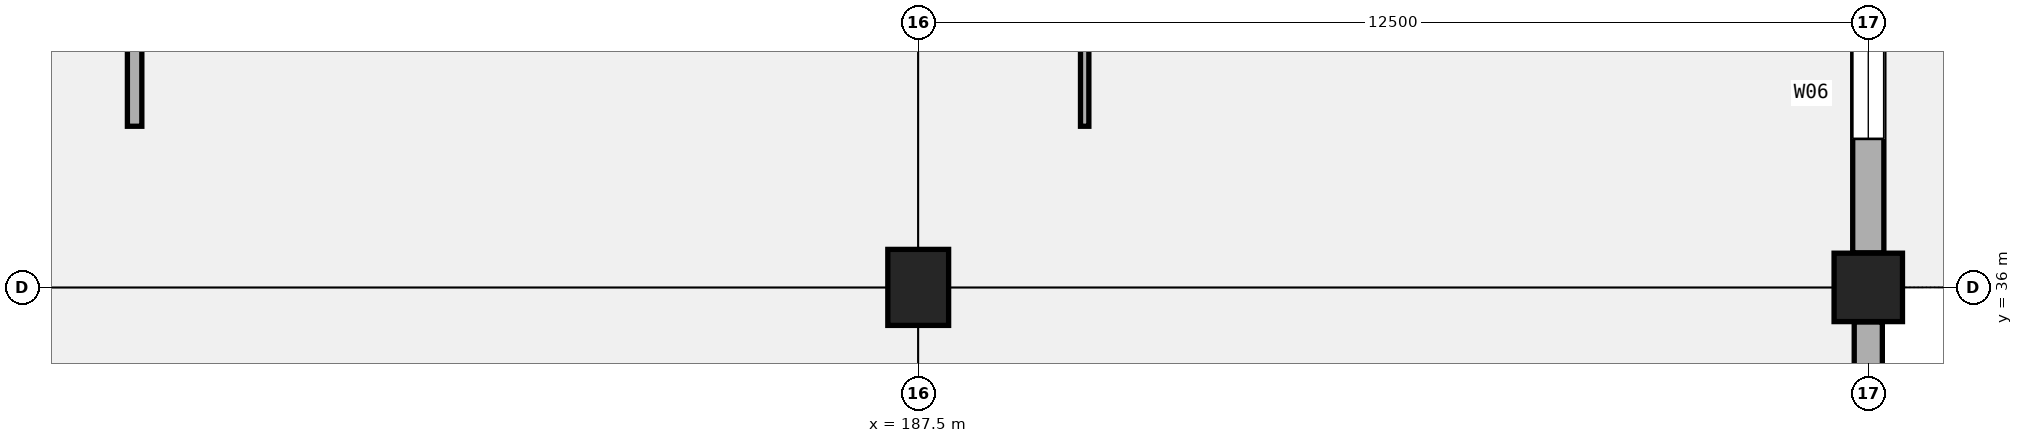
"""IFC4 building model, lengths in metres.
Left out: names, types, materials, properties, quantities, classifications, styles, units other than length and angle.
Written with IfcOpenShell. Run it as: python <this file> out.ifc"""

import sys

from ifc_helpers import new_model, si_unit, direction, frame, frame_2d, origin, origin_2d, place, context, subcontext, project, spatial, rectangle, extrude, element, fill, save


model = new_model("IFC4")
c1 = context("Model", 3, precision=1e-05, world=origin(), true_north=direction((0.0, 1.0)))
c2 = subcontext(c1, "Body", "Model", "MODEL_VIEW")
j1 = project(units=[si_unit("LENGTHUNIT", "METRE"), si_unit("PLANEANGLEUNIT", "RADIAN")], contexts=[c1])
p1 = place(None, origin())
s1 = spatial("IfcSite", under=j1, at=p1, CompositionType="ELEMENT")
p2 = place(p1, origin())
s2 = spatial("IfcBuilding", under=s1, at=p2, CompositionType="ELEMENT")
p3 = place(p2, frame((0.0, 0.0, 10.2)))
s3 = spatial("IfcBuildingStorey", under=s2, at=p3, CompositionType="ELEMENT", Elevation=10.2)
p4 = place(p3, frame((187.5, 36.0, 0.0), z_axis=(0.0, 0.0, 1.0), x_axis=(1.0, 0.0, 0.0)))
e1 = element("IfcColumn", 1, at=p4, inside=s3, PredefinedType="COLUMN", context=c2, shape_type="SweptSolid", body=[
    extrude(rectangle(XDim=0.8, YDim=1.0, at=origin_2d()), origin(), (0.0, 0.0, 1.0), 5.1),
])
p5 = place(p3, frame((200.0, 36.0, 0.0), z_axis=(0.0, 0.0, 1.0), x_axis=(1.0, 0.0, 0.0)))
e2 = element("IfcColumn", 2, at=p5, inside=s3, PredefinedType="COLUMN", context=c2, shape_type="SweptSolid", body=[
    extrude(rectangle(XDim=0.9, YDim=0.9, at=origin_2d()), origin(), (0.0, 0.0, 1.0), 5.1),
])
p6 = place(p3, frame((200.0, 34.896, 0.0), z_axis=(0.0, 0.0, 1.0), x_axis=(0.0, 1.0, 0.0)))
e3 = element("IfcWall", 3, at=p6, inside=s3, PredefinedType="SOLIDWALL", context=c2, shape_type="SweptSolid", body=[
    extrude(rectangle(XDim=0.65, YDim=0.37, at=frame_2d((0.325, 0.0))), origin(), (0.0, 0.0, 1.0), 4.02),
])
p7 = place(p3, frame((200.0, 36.454, 0.0), z_axis=(0.0, 0.0, 1.0), x_axis=(0.0, 1.0, 0.0)))
e4 = element("IfcWall", 4, at=p7, inside=s3, PredefinedType="SOLIDWALL", context=c2, shape_type="SweptSolid", body=[
    extrude(rectangle(XDim=11.142, YDim=0.41, at=frame_2d((5.571, 0.0))), origin(), (0.0, 0.0, 1.0), 4.12),
])
p8 = place(p7, frame((1.5, 0.0, 0.95)))
e5 = element("IfcOpeningElement", 5, at=p8, cuts=e4, PredefinedType="OPENING", context=c2, shape_type="SweptSolid", body=[
    extrude(rectangle(XDim=1.2, YDim=2.3, at=frame_2d((0.6, 1.15))), frame((0.0, 0.215, 0.0), z_axis=(0.0, -1.0, 0.0), x_axis=(1.0, 0.0, 0.0)), (0.0, 0.0, 1.0), 0.43),
])
p9 = place(p3, frame((177.19, 38.12, 0.0), z_axis=(0.0, 0.0, 1.0), x_axis=(0.0, 1.0, 0.0)))
e6 = element("IfcWall", 6, at=p9, inside=s3, PredefinedType="PARTITIONING", context=c2, shape_type="SweptSolid", body=[
    extrude(rectangle(XDim=9.72, YDim=0.19, at=frame_2d((4.86, 0.0))), origin(), (0.0, 0.0, 1.0), 4.22),
])
p10 = place(p9, frame((2.944, 0.0, 0.0), z_axis=(0.0, 0.0, 1.0), x_axis=(-1.0, 0.0, 0.0)))
e7 = element("IfcOpeningElement", 7, at=p10, cuts=e6, PredefinedType="OPENING", context=c2, shape_type="SweptSolid", body=[
    extrude(rectangle(XDim=1.4, YDim=2.24, at=frame_2d((0.7, 1.12))), frame((0.0, 0.105, 0.0), z_axis=(0.0, -1.0, 0.0), x_axis=(1.0, 0.0, 0.0)), (0.0, 0.0, 1.0), 0.21),
])
p11 = place(p9, frame((7.904, 0.0, 0.0), z_axis=(0.0, 0.0, 1.0), x_axis=(-1.0, 0.0, 0.0)))
e8 = element("IfcOpeningElement", 8, at=p11, cuts=e6, PredefinedType="OPENING", context=c2, shape_type="SweptSolid", body=[
    extrude(rectangle(XDim=1.44, YDim=2.26, at=frame_2d((0.72, 1.13))), frame((0.0, 0.105, 0.0), z_axis=(0.0, -1.0, 0.0), x_axis=(1.0, 0.0, 0.0)), (0.0, 0.0, 1.0), 0.21),
])
p12 = place(p3, frame((189.69, 38.12, 0.0), z_axis=(0.0, 0.0, 1.0), x_axis=(0.0, 1.0, 0.0)))
e9 = element("IfcWall", 9, at=p12, inside=s3, PredefinedType="PARTITIONING", context=c2, shape_type="SweptSolid", body=[
    extrude(rectangle(XDim=9.72, YDim=0.11, at=frame_2d((4.86, 0.0))), origin(), (0.0, 0.0, 1.0), 4.22),
])
p13 = place(p12, frame((5.335, 0.0, 0.0), z_axis=(0.0, 0.0, 1.0), x_axis=(-1.0, 0.0, 0.0)))
e10 = element("IfcOpeningElement", 10, at=p13, cuts=e9, PredefinedType="OPENING", context=c2, shape_type="SweptSolid", body=[
    extrude(rectangle(XDim=0.95, YDim=2.12, at=frame_2d((0.475, 1.06))), frame((0.0, 0.065, 0.0), z_axis=(0.0, -1.0, 0.0), x_axis=(1.0, 0.0, 0.0)), (0.0, 0.0, 1.0), 0.13),
])
p14 = place(p8, origin())
e11 = element("IfcWindow", 11, at=p14, inside=s3, PartitioningType="SINGLE_PANEL", PredefinedType="WINDOW", context=c2, shape_type="SweptSolid", body=[
    extrude(rectangle(XDim=1.2, YDim=2.3, at=frame_2d((0.6, 1.15))), frame((0.0, 0.03, 0.0), z_axis=(0.0, -1.0, 0.0), x_axis=(1.0, 0.0, 0.0)), (0.0, 0.0, 1.0), 0.06),
])
fill(e5, e11)
save(model, sys.argv[1])
